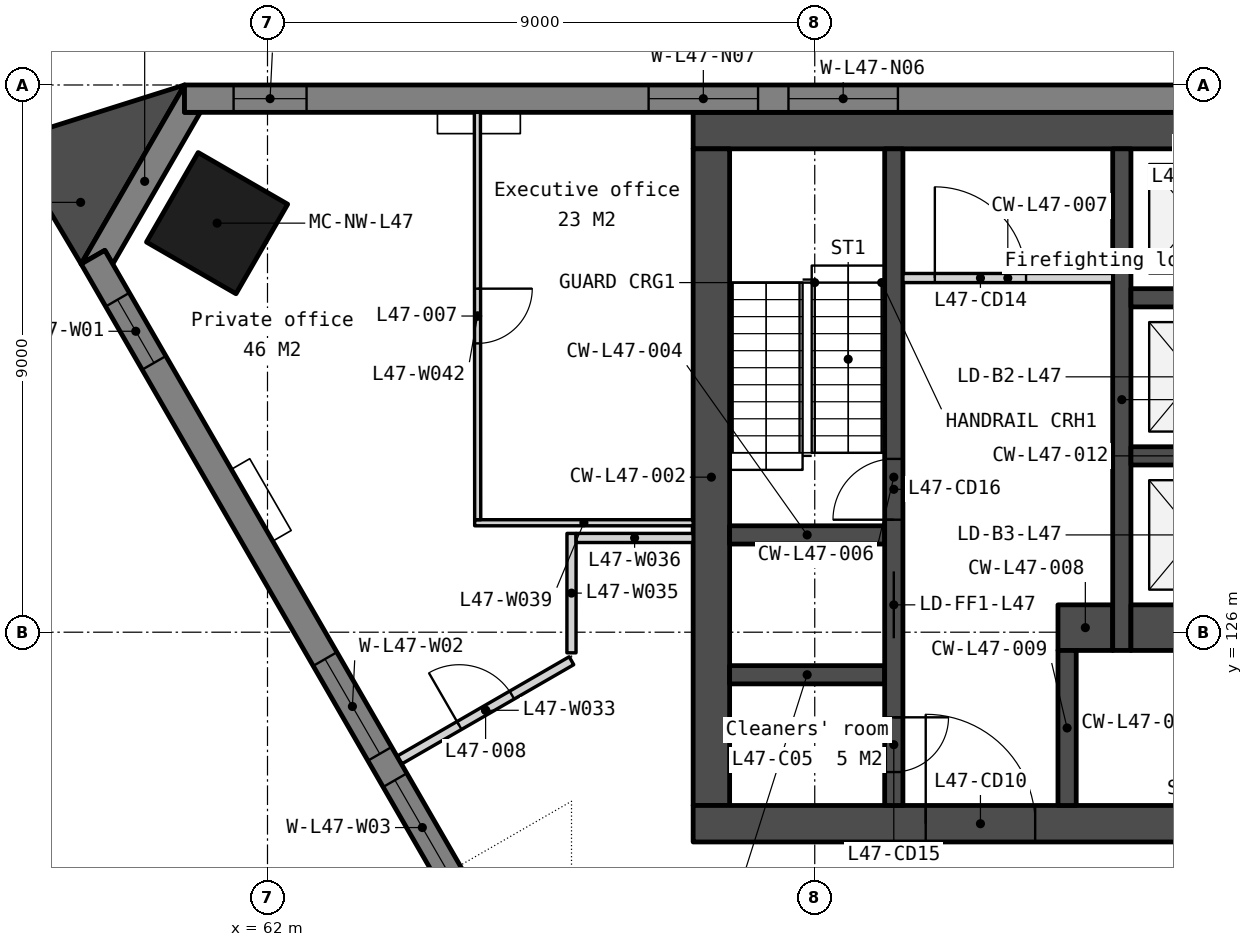
"""IFC4 building model, lengths in metres.
Left out: names, types, materials, properties, quantities, classifications, styles, units other than length and angle.
Written with IfcOpenShell. Run it as: python <this file> out.ifc"""

import sys

from ifc_helpers import new_model, si_unit, direction, frame, frame_2d, origin, origin_2d, place, context, subcontext, project, spatial, polyline, rectangle, outline, extrude, element, fill, save


model = new_model("IFC4")
c1 = context("Model", 3, precision=1e-05, world=origin(), true_north=direction((0.0, 1.0)))
c2 = subcontext(c1, "Body", "Model", "MODEL_VIEW")
j1 = project(units=[si_unit("LENGTHUNIT", "METRE"), si_unit("PLANEANGLEUNIT", "RADIAN")], contexts=[c1])
p1 = place(None, origin())
s1 = spatial("IfcSite", under=j1, at=p1, CompositionType="ELEMENT")
p2 = place(p1, origin())
s2 = spatial("IfcBuilding", under=s1, at=p2, CompositionType="ELEMENT")
p3 = place(p2, frame((0.0, 0.0, 188.0)))
s3 = spatial("IfcBuildingStorey", under=s2, at=p3, CompositionType="ELEMENT", Elevation=188.0)
p4 = place(p3, frame((61.171, 132.728, 0.0), z_axis=(0.0, 0.0, 1.0), x_axis=(-0.5, -0.866025403784, 0.0)))
e1 = element("IfcColumn", 1, at=p4, inside=s3, PredefinedType="COLUMN", context=c2, shape_type="SweptSolid", body=[
    extrude(rectangle(XDim=1.7, YDim=1.7, at=origin_2d()), origin(), (0.0, 0.0, 1.0), 3.9),
])
p5 = place(p3, frame((69.0, 134.25, 0.0), z_axis=(0.0, 0.0, 1.0), x_axis=(1.0, 0.0, 0.0)))
e2 = element("IfcWall", 2, at=p5, inside=s3, PredefinedType="SOLIDWALL", context=c2, shape_type="SweptSolid", body=[
    extrude(rectangle(XDim=22.0, YDim=0.6, at=frame_2d((11.0, 0.0))), origin(), (0.0, 0.0, 1.0), 3.75),
])
p6 = place(p3, frame((69.3, 133.95, 0.0), z_axis=(0.0, 0.0, 1.0), x_axis=(0.0, -1.0, 0.0)))
e3 = element("IfcWall", 3, at=p6, inside=s3, PredefinedType="SOLIDWALL", context=c2, shape_type="SweptSolid", body=[
    extrude(rectangle(XDim=10.8, YDim=0.6, at=frame_2d((5.4, 0.0))), origin(), (0.0, 0.0, 1.0), 3.75),
])
p7 = place(p3, frame((69.0, 122.85, 0.0), z_axis=(0.0, 0.0, 1.0), x_axis=(1.0, 0.0, 0.0)))
e4 = element("IfcWall", 4, at=p7, inside=s3, PredefinedType="SOLIDWALL", context=c2, shape_type="SweptSolid", body=[
    extrude(rectangle(XDim=22.0, YDim=0.6, at=frame_2d((11.0, 0.0))), origin(), (0.0, 0.0, 1.0), 3.75),
])
p8 = place(p7, frame((16.375, 0.0, 0.0)))
e5 = element("IfcOpeningElement", 5, at=p8, cuts=e4, PredefinedType="OPENING", context=c2, shape_type="SweptSolid", body=[
    extrude(rectangle(XDim=1.8, YDim=2.1, at=frame_2d((0.9, 1.05))), frame((0.0, 0.31, 0.0), z_axis=(0.0, -1.0, 0.0), x_axis=(1.0, 0.0, 0.0)), (0.0, 0.0, 1.0), 0.62),
])
p9 = place(p7, frame((3.825, 0.0, 0.0)))
e6 = element("IfcOpeningElement", 6, at=p9, cuts=e4, PredefinedType="OPENING", context=c2, shape_type="SweptSolid", body=[
    extrude(rectangle(XDim=1.8, YDim=2.1, at=frame_2d((0.9, 1.05))), frame((0.0, 0.31, 0.0), z_axis=(0.0, -1.0, 0.0), x_axis=(1.0, 0.0, 0.0)), (0.0, 0.0, 1.0), 0.62),
])
p10 = place(p7, frame((12.85, 0.0, 0.0)))
e7 = element("IfcOpeningElement", 7, at=p10, cuts=e4, PredefinedType="OPENING", context=c2, shape_type="SweptSolid", body=[
    extrude(rectangle(XDim=1.5, YDim=2.1, at=frame_2d((0.75, 1.05))), frame((0.0, 0.31, 0.0), z_axis=(0.0, -1.0, 0.0), x_axis=(1.0, 0.0, 0.0)), (0.0, 0.0, 1.0), 0.62),
])
for number, where, z_axis, x_axis in (
    (8, (69.6, 127.6, 0.0), (0.0, 0.0, 1.0), (1.0, 0.0, 0.0)),
    (9, (69.6, 125.3, 0.0), (0.0, 0.0, 1.0), (1.0, 0.0, 0.0)),
):
    element("IfcWall", number, at=place(p3, frame(where, z_axis=z_axis, x_axis=x_axis)), inside=s3, PredefinedType="SOLIDWALL", context=c2, shape_type="SweptSolid", body=[
        extrude(rectangle(XDim=2.55, YDim=0.3, at=frame_2d((1.275, 0.0))), origin(), (0.0, 0.0, 1.0), 3.75),
    ])
p11 = place(p3, frame((72.3, 133.95, 0.0), z_axis=(0.0, 0.0, 1.0), x_axis=(0.0, -1.0, 0.0)))
e10 = element("IfcWall", 10, at=p11, inside=s3, PredefinedType="SOLIDWALL", context=c2, shape_type="SweptSolid", body=[
    extrude(rectangle(XDim=10.8, YDim=0.3, at=frame_2d((5.4, 0.0))), origin(), (0.0, 0.0, 1.0), 3.75),
])
p12 = place(p11, frame((6.95, 0.0, 0.0)))
e11 = element("IfcOpeningElement", 11, at=p12, cuts=e10, PredefinedType="OPENING", context=c2, shape_type="SweptSolid", body=[
    extrude(rectangle(XDim=1.1, YDim=2.1, at=frame_2d((0.55, 1.05))), frame((0.0, 0.16, 0.0), z_axis=(0.0, -1.0, 0.0), x_axis=(1.0, 0.0, 0.0)), (0.0, 0.0, 1.0), 0.32),
])
p13 = place(p11, frame((9.35, 0.0, 0.0)))
e12 = element("IfcOpeningElement", 12, at=p13, cuts=e10, PredefinedType="OPENING", context=c2, shape_type="SweptSolid", body=[
    extrude(rectangle(XDim=0.9, YDim=2.1, at=frame_2d((0.45, 1.05))), frame((0.0, 0.16, 0.0), z_axis=(0.0, -1.0, 0.0), x_axis=(1.0, 0.0, 0.0)), (0.0, 0.0, 1.0), 0.32),
])
p14 = place(p11, frame((5.1, 0.0, 0.0)))
e13 = element("IfcOpeningElement", 13, at=p14, cuts=e10, PredefinedType="OPENING", context=c2, shape_type="SweptSolid", body=[
    extrude(rectangle(XDim=1.0, YDim=2.1, at=frame_2d((0.5, 1.05))), frame((0.0, 0.16, 0.0), z_axis=(0.0, -1.0, 0.0), x_axis=(1.0, 0.0, 0.0)), (0.0, 0.0, 1.0), 0.32),
])
p15 = place(p3, frame((72.45, 131.825, 0.0), z_axis=(0.0, 0.0, 1.0), x_axis=(1.0, 0.0, 0.0)))
e14 = element("IfcWall", 14, at=p15, inside=s3, PredefinedType="PARTITIONING", context=c2, shape_type="SweptSolid", body=[
    extrude(rectangle(XDim=3.45, YDim=0.15, at=frame_2d((1.725, 0.0))), origin(), (0.0, 0.0, 1.0), 3.75),
])
p16 = place(p15, frame((0.525, 0.0, 0.0)))
e15 = element("IfcOpeningElement", 15, at=p16, cuts=e14, PredefinedType="OPENING", context=c2, shape_type="SweptSolid", body=[
    extrude(rectangle(XDim=1.5, YDim=2.1, at=frame_2d((0.75, 1.05))), frame((0.0, 0.085, 0.0), z_axis=(0.0, -1.0, 0.0), x_axis=(1.0, 0.0, 0.0)), (0.0, 0.0, 1.0), 0.17),
])
p17 = place(p3, frame((75.0, 126.075, 0.0), z_axis=(0.0, 0.0, 1.0), x_axis=(1.0, 0.0, 0.0)))
e16 = element("IfcWall", 16, at=p17, inside=s3, PredefinedType="SOLIDWALL", context=c2, shape_type="SweptSolid", body=[
    extrude(rectangle(XDim=0.9, YDim=0.75, at=frame_2d((0.45, 0.0))), origin(), (0.0, 0.0, 1.0), 3.75),
])
p18 = place(p3, frame((75.15, 125.7, 0.0), z_axis=(0.0, 0.0, 1.0), x_axis=(0.0, -1.0, 0.0)))
e17 = element("IfcWall", 17, at=p18, inside=s3, PredefinedType="SOLIDWALL", context=c2, shape_type="SweptSolid", body=[
    extrude(rectangle(XDim=2.55, YDim=0.3, at=frame_2d((1.275, 0.0))), origin(), (0.0, 0.0, 1.0), 3.75),
])
p19 = place(p3, frame((76.05, 133.95, 0.0), z_axis=(0.0, 0.0, 1.0), x_axis=(0.0, -1.0, 0.0)))
e18 = element("IfcWall", 18, at=p19, inside=s3, PredefinedType="SOLIDWALL", context=c2, shape_type="SweptSolid", body=[
    extrude(rectangle(XDim=8.25, YDim=0.3, at=frame_2d((4.125, 0.0))), origin(), (0.0, 0.0, 1.0), 3.75),
])
for number, where, z_axis, x_axis in (
    (19, (76.2, 131.5, 0.0), (0.0, 0.0, 1.0), (1.0, 0.0, 0.0)),
    (20, (76.2, 128.9, 0.0), (0.0, 0.0, 1.0), (1.0, 0.0, 0.0)),
):
    element("IfcWall", number, at=place(p3, frame(where, z_axis=z_axis, x_axis=x_axis)), inside=s3, PredefinedType="SOLIDWALL", context=c2, shape_type="SweptSolid", body=[
        extrude(rectangle(XDim=2.1, YDim=0.3, at=frame_2d((1.05, 0.0))), origin(), (0.0, 0.0, 1.0), 3.75),
    ])
p20 = place(p3, frame((76.2, 126.075, 0.0), z_axis=(0.0, 0.0, 1.0), x_axis=(1.0, 0.0, 0.0)))
e21 = element("IfcWall", 21, at=p20, inside=s3, PredefinedType="SOLIDWALL", context=c2, shape_type="SweptSolid", body=[
    extrude(rectangle(XDim=2.1, YDim=0.75, at=frame_2d((1.05, 0.0))), origin(), (0.0, 0.0, 1.0), 3.75),
])
p21 = place(p3, frame((0.0, 0.0, -0.15)))
e22 = element("IfcWall", 22, at=p21, inside=s3, PredefinedType="SOLIDWALL", context=c2, shape_type="SweptSolid", body=[
    extrude(outline(polyline([(60.635, 135.0), (60.635, 134.55), (60.895, 134.55), (59.455, 132.055), (59.325, 132.281), (58.935, 132.055), (60.635, 135.0)])), origin(), (0.0, 0.0, 1.0), 3.9),
])
p22 = place(p3, frame((99.365, 134.775, -0.15), z_axis=(0.0, 0.0, 1.0), x_axis=(-1.0, 0.0, 0.0)))
e23 = element("IfcWall", 23, at=p22, inside=s3, PredefinedType="SOLIDWALL", context=c2, shape_type="SweptSolid", body=[
    extrude(outline(polyline([(38.729, 0.0), (38.729, 3.9), (0.0, 3.9), (0.0, 0.0), (38.729, 0.0)])), frame((0.0, 0.225, 0.0), z_axis=(0.0, -1.0, 0.0), x_axis=(1.0, 0.0, 0.0)), (0.0, 0.0, 1.0), 0.45),
])
p23 = place(p22, frame((0.807, 0.0, 0.95)))
e24 = element("IfcOpeningElement", 24, at=p23, cuts=e23, PredefinedType="OPENING", context=c2, shape_type="SweptSolid", body=[
    extrude(rectangle(XDim=1.2, YDim=2.2, at=frame_2d((0.6, 1.1))), frame((0.0, 0.235, 0.0), z_axis=(0.0, -1.0, 0.0), x_axis=(1.0, 0.0, 0.0)), (0.0, 0.0, 1.0), 0.47),
])
p24 = place(p22, frame((7.632, 0.0, 0.95)))
e25 = element("IfcOpeningElement", 25, at=p24, cuts=e23, PredefinedType="OPENING", context=c2, shape_type="SweptSolid", body=[
    extrude(rectangle(XDim=1.8, YDim=2.2, at=frame_2d((0.9, 1.1))), frame((0.0, 0.235, 0.0), z_axis=(0.0, -1.0, 0.0), x_axis=(1.0, 0.0, 0.0)), (0.0, 0.0, 1.0), 0.47),
])
p25 = place(p22, frame((9.932, 0.0, 0.95)))
e26 = element("IfcOpeningElement", 26, at=p25, cuts=e23, PredefinedType="OPENING", context=c2, shape_type="SweptSolid", body=[
    extrude(rectangle(XDim=1.8, YDim=2.2, at=frame_2d((0.9, 1.1))), frame((0.0, 0.235, 0.0), z_axis=(0.0, -1.0, 0.0), x_axis=(1.0, 0.0, 0.0)), (0.0, 0.0, 1.0), 0.47),
])
p26 = place(p22, frame((17.315, 0.0, 0.95)))
e27 = element("IfcOpeningElement", 27, at=p26, cuts=e23, PredefinedType="OPENING", context=c2, shape_type="SweptSolid", body=[
    extrude(rectangle(XDim=1.8, YDim=2.2, at=frame_2d((0.9, 1.1))), frame((0.0, 0.235, 0.0), z_axis=(0.0, -1.0, 0.0), x_axis=(1.0, 0.0, 0.0)), (0.0, 0.0, 1.0), 0.47),
])
p27 = place(p22, frame((19.615, 0.0, 0.95)))
e28 = element("IfcOpeningElement", 28, at=p27, cuts=e23, PredefinedType="OPENING", context=c2, shape_type="SweptSolid", body=[
    extrude(rectangle(XDim=1.8, YDim=2.2, at=frame_2d((0.9, 1.1))), frame((0.0, 0.235, 0.0), z_axis=(0.0, -1.0, 0.0), x_axis=(1.0, 0.0, 0.0)), (0.0, 0.0, 1.0), 0.47),
])
p28 = place(p22, frame((26.997, 0.0, 0.95)))
e29 = element("IfcOpeningElement", 29, at=p28, cuts=e23, PredefinedType="OPENING", context=c2, shape_type="SweptSolid", body=[
    extrude(rectangle(XDim=1.8, YDim=2.2, at=frame_2d((0.9, 1.1))), frame((0.0, 0.235, 0.0), z_axis=(0.0, -1.0, 0.0), x_axis=(1.0, 0.0, 0.0)), (0.0, 0.0, 1.0), 0.47),
])
p29 = place(p22, frame((29.297, 0.0, 0.95)))
e30 = element("IfcOpeningElement", 30, at=p29, cuts=e23, PredefinedType="OPENING", context=c2, shape_type="SweptSolid", body=[
    extrude(rectangle(XDim=1.8, YDim=2.2, at=frame_2d((0.9, 1.1))), frame((0.0, 0.235, 0.0), z_axis=(0.0, -1.0, 0.0), x_axis=(1.0, 0.0, 0.0)), (0.0, 0.0, 1.0), 0.47),
])
p30 = place(p22, frame((36.722, 0.0, 0.95)))
e31 = element("IfcOpeningElement", 31, at=p30, cuts=e23, PredefinedType="OPENING", context=c2, shape_type="SweptSolid", body=[
    extrude(rectangle(XDim=1.2, YDim=2.2, at=frame_2d((0.6, 1.1))), frame((0.0, 0.235, 0.0), z_axis=(0.0, -1.0, 0.0), x_axis=(1.0, 0.0, 0.0)), (0.0, 0.0, 1.0), 0.47),
])
p31 = place(p3, frame((59.13, 132.168, -0.15), z_axis=(0.0, 0.0, 1.0), x_axis=(0.500002199942, -0.866024133644, 0.0)))
e32 = element("IfcWall", 32, at=p31, inside=s3, PredefinedType="SOLIDWALL", context=c2, shape_type="SweptSolid", body=[
    extrude(outline(polyline([(38.729, 0.0), (38.729, 3.9), (0.0, 3.9), (0.0, 0.0), (38.729, 0.0)])), frame((0.0, 0.225, 0.0), z_axis=(0.0, -1.0, 0.0), x_axis=(1.0, 0.0, 0.0)), (0.0, 0.0, 1.0), 0.45),
])
p32 = place(p31, frame((0.807, 0.0, 0.95)))
e33 = element("IfcOpeningElement", 33, at=p32, cuts=e32, PredefinedType="OPENING", context=c2, shape_type="SweptSolid", body=[
    extrude(rectangle(XDim=1.2, YDim=2.2, at=frame_2d((0.6, 1.1))), frame((0.0, 0.235, 0.0), z_axis=(0.0, -1.0, 0.0), x_axis=(1.0, 0.0, 0.0)), (0.0, 0.0, 1.0), 0.47),
])
p33 = place(p31, frame((7.632, 0.0, 0.95)))
e34 = element("IfcOpeningElement", 34, at=p33, cuts=e32, PredefinedType="OPENING", context=c2, shape_type="SweptSolid", body=[
    extrude(rectangle(XDim=1.8, YDim=2.2, at=frame_2d((0.9, 1.1))), frame((0.0, 0.235, 0.0), z_axis=(0.0, -1.0, 0.0), x_axis=(1.0, 0.0, 0.0)), (0.0, 0.0, 1.0), 0.47),
])
p34 = place(p31, frame((9.932, 0.0, 0.95)))
e35 = element("IfcOpeningElement", 35, at=p34, cuts=e32, PredefinedType="OPENING", context=c2, shape_type="SweptSolid", body=[
    extrude(rectangle(XDim=1.8, YDim=2.2, at=frame_2d((0.9, 1.1))), frame((0.0, 0.235, 0.0), z_axis=(0.0, -1.0, 0.0), x_axis=(1.0, 0.0, 0.0)), (0.0, 0.0, 1.0), 0.47),
])
p35 = place(p31, frame((17.315, 0.0, 0.95)))
e36 = element("IfcOpeningElement", 36, at=p35, cuts=e32, PredefinedType="OPENING", context=c2, shape_type="SweptSolid", body=[
    extrude(rectangle(XDim=1.8, YDim=2.2, at=frame_2d((0.9, 1.1))), frame((0.0, 0.235, 0.0), z_axis=(0.0, -1.0, 0.0), x_axis=(1.0, 0.0, 0.0)), (0.0, 0.0, 1.0), 0.47),
])
p36 = place(p31, frame((19.615, 0.0, 0.95)))
e37 = element("IfcOpeningElement", 37, at=p36, cuts=e32, PredefinedType="OPENING", context=c2, shape_type="SweptSolid", body=[
    extrude(rectangle(XDim=1.8, YDim=2.2, at=frame_2d((0.9, 1.1))), frame((0.0, 0.235, 0.0), z_axis=(0.0, -1.0, 0.0), x_axis=(1.0, 0.0, 0.0)), (0.0, 0.0, 1.0), 0.47),
])
p37 = place(p31, frame((26.997, 0.0, 0.95)))
e38 = element("IfcOpeningElement", 38, at=p37, cuts=e32, PredefinedType="OPENING", context=c2, shape_type="SweptSolid", body=[
    extrude(rectangle(XDim=1.8, YDim=2.2, at=frame_2d((0.9, 1.1))), frame((0.0, 0.235, 0.0), z_axis=(0.0, -1.0, 0.0), x_axis=(1.0, 0.0, 0.0)), (0.0, 0.0, 1.0), 0.47),
])
p38 = place(p31, frame((29.297, 0.0, 0.95)))
e39 = element("IfcOpeningElement", 39, at=p38, cuts=e32, PredefinedType="OPENING", context=c2, shape_type="SweptSolid", body=[
    extrude(rectangle(XDim=1.8, YDim=2.2, at=frame_2d((0.9, 1.1))), frame((0.0, 0.235, 0.0), z_axis=(0.0, -1.0, 0.0), x_axis=(1.0, 0.0, 0.0)), (0.0, 0.0, 1.0), 0.47),
])
p39 = place(p31, frame((36.722, 0.0, 0.95)))
e40 = element("IfcOpeningElement", 40, at=p39, cuts=e32, PredefinedType="OPENING", context=c2, shape_type="SweptSolid", body=[
    extrude(rectangle(XDim=1.2, YDim=2.2, at=frame_2d((0.6, 1.1))), frame((0.0, 0.235, 0.0), z_axis=(0.0, -1.0, 0.0), x_axis=(1.0, 0.0, 0.0)), (0.0, 0.0, 1.0), 0.47),
])
p40 = place(p3, frame((0.0, 0.0, -0.15)))
e41 = element("IfcWall", 41, at=p40, inside=s3, PredefinedType="SOLIDWALL", context=c2, shape_type="SweptSolid", body=[
    extrude(outline(polyline([(60.635, 135.0), (57.73, 134.083), (58.935, 132.055), (60.635, 135.0)])), origin(), (0.0, 0.0, 1.0), 3.9),
])
p41 = place(p3, frame((64.175, 123.9, 0.0), z_axis=(0.0, 0.0, 1.0), x_axis=(0.866032230194, 0.499988176125, 0.0)))
e42 = element("IfcWall", 42, at=p41, inside=s3, PredefinedType="PARTITIONING", context=c2, shape_type="SweptSolid", body=[
    extrude(rectangle(XDim=3.261, YDim=0.15, at=frame_2d((1.63, 0.0))), origin(), (0.0, 0.0, 1.0), 3.75),
])
p42 = place(p41, frame((1.13, 0.0, 0.0)))
e43 = element("IfcOpeningElement", 43, at=p42, cuts=e42, PredefinedType="OPENING", context=c2, shape_type="SweptSolid", body=[
    extrude(rectangle(XDim=1.0, YDim=2.1, at=frame_2d((0.5, 1.05))), frame((0.0, 0.085, 0.0), z_axis=(0.0, -1.0, 0.0), x_axis=(1.0, 0.0, 0.0)), (0.0, 0.0, 1.0), 0.17),
])
p43 = place(p3, frame((66.999, 125.661, 0.0), z_axis=(0.0, 0.0, 1.0), x_axis=(0.00049720317, 0.999999876394, 0.0)))
e44 = element("IfcWall", 44, at=p43, inside=s3, PredefinedType="PARTITIONING", context=c2, shape_type="SweptSolid", body=[
    extrude(rectangle(XDim=1.964, YDim=0.15, at=frame_2d((0.982, 0.0))), origin(), (0.0, 0.0, 1.0), 3.75),
])
p44 = place(p3, frame((67.075, 127.55, 0.0), z_axis=(0.0, 0.0, 1.0), x_axis=(1.0, 0.0, 0.0)))
e45 = element("IfcWall", 45, at=p44, inside=s3, PredefinedType="PARTITIONING", context=c2, shape_type="SweptSolid", body=[
    extrude(rectangle(XDim=1.925, YDim=0.15, at=frame_2d((0.962, 0.0))), origin(), (0.0, 0.0, 1.0), 3.75),
])
p45 = place(p3, frame((65.407, 127.8, 0.0), z_axis=(0.0, 0.0, 1.0), x_axis=(1.0, 0.0, 0.0)))
e46 = element("IfcWall", 46, at=p45, inside=s3, PredefinedType="PARTITIONING", context=c2, shape_type="SweptSolid", body=[
    extrude(rectangle(XDim=3.593, YDim=0.1, at=frame_2d((1.796, 0.0))), origin(), (0.0, 0.0, 1.0), 3.28),
])
p46 = place(p3, frame((65.452, 134.55, 0.0), z_axis=(0.0, 0.0, 1.0), x_axis=(0.000728783103, -0.999999734438, 0.0)))
e47 = element("IfcWall", 47, at=p46, inside=s3, PredefinedType="PARTITIONING", context=c2, shape_type="SweptSolid", body=[
    extrude(rectangle(XDim=6.7, YDim=0.1, at=frame_2d((3.35, 0.0))), origin(), (0.0, 0.0, 1.0), 3.28),
])
p47 = place(p46, frame((2.9, 0.0, 0.0)))
e48 = element("IfcOpeningElement", 48, at=p47, cuts=e47, PredefinedType="OPENING", context=c2, shape_type="SweptSolid", body=[
    extrude(rectangle(XDim=0.9, YDim=2.1, at=frame_2d((0.45, 1.05))), frame((0.0, 0.06, 0.0), z_axis=(0.0, -1.0, 0.0), x_axis=(1.0, 0.0, 0.0)), (0.0, 0.0, 1.0), 0.12),
])
p48 = place(p12, origin())
e49 = element("IfcDoor", 49, at=p48, inside=s3, OperationType="SLIDING_TO_LEFT", PredefinedType="DOOR", context=c2, shape_type="SweptSolid", body=[
    extrude(rectangle(XDim=1.1, YDim=2.1, at=frame_2d((0.55, 1.05))), frame((0.0, 0.025, 0.0), z_axis=(0.0, -1.0, 0.0), x_axis=(1.0, 0.0, 0.0)), (0.0, 0.0, 1.0), 0.05),
])
fill(e11, e49)
p49 = place(p9, origin())
e50 = element("IfcDoor", 50, at=p49, inside=s3, OperationType="DOUBLE_DOOR_DOUBLE_SWING", PredefinedType="DOOR", context=c2, shape_type="SweptSolid", body=[
    extrude(rectangle(XDim=1.8, YDim=2.1, at=frame_2d((0.9, 1.05))), frame((0.0, 0.025, 0.0), z_axis=(0.0, -1.0, 0.0), x_axis=(1.0, 0.0, 0.0)), (0.0, 0.0, 1.0), 0.05),
])
fill(e6, e50)
p50 = place(p16, origin())
e51 = element("IfcDoor", 51, at=p50, inside=s3, OperationType="DOUBLE_DOOR_DOUBLE_SWING", PredefinedType="DOOR", context=c2, shape_type="SweptSolid", body=[
    extrude(rectangle(XDim=1.5, YDim=2.1, at=frame_2d((0.75, 1.05))), frame((0.0, 0.025, 0.0), z_axis=(0.0, -1.0, 0.0), x_axis=(1.0, 0.0, 0.0)), (0.0, 0.0, 1.0), 0.05),
])
fill(e15, e51)
p51 = place(p13, origin())
e52 = element("IfcDoor", 52, at=p51, inside=s3, OperationType="SINGLE_SWING_LEFT", PredefinedType="DOOR", context=c2, shape_type="SweptSolid", body=[
    extrude(rectangle(XDim=0.9, YDim=2.1, at=frame_2d((0.45, 1.05))), frame((0.0, 0.025, 0.0), z_axis=(0.0, -1.0, 0.0), x_axis=(1.0, 0.0, 0.0)), (0.0, 0.0, 1.0), 0.05),
])
fill(e12, e52)
p52 = place(p14, origin())
e53 = element("IfcDoor", 53, at=p52, inside=s3, OperationType="SINGLE_SWING_RIGHT", PredefinedType="DOOR", context=c2, shape_type="SweptSolid", body=[
    extrude(rectangle(XDim=1.0, YDim=2.1, at=frame_2d((0.5, 1.05))), frame((0.0, 0.025, 0.0), z_axis=(0.0, -1.0, 0.0), x_axis=(1.0, 0.0, 0.0)), (0.0, 0.0, 1.0), 0.05),
])
fill(e13, e53)
p53 = place(p28, origin())
e54 = element("IfcWindow", 54, at=p53, inside=s3, PartitioningType="SINGLE_PANEL", PredefinedType="WINDOW", context=c2, shape_type="SweptSolid", body=[
    extrude(rectangle(XDim=1.8, YDim=2.2, at=frame_2d((0.9, 1.1))), frame((0.0, 0.03, 0.0), z_axis=(0.0, -1.0, 0.0), x_axis=(1.0, 0.0, 0.0)), (0.0, 0.0, 1.0), 0.06),
])
fill(e29, e54)
p54 = place(p29, origin())
e55 = element("IfcWindow", 55, at=p54, inside=s3, PartitioningType="SINGLE_PANEL", PredefinedType="WINDOW", context=c2, shape_type="SweptSolid", body=[
    extrude(rectangle(XDim=1.8, YDim=2.2, at=frame_2d((0.9, 1.1))), frame((0.0, 0.03, 0.0), z_axis=(0.0, -1.0, 0.0), x_axis=(1.0, 0.0, 0.0)), (0.0, 0.0, 1.0), 0.06),
])
fill(e30, e55)
p55 = place(p30, origin())
e56 = element("IfcWindow", 56, at=p55, inside=s3, PartitioningType="SINGLE_PANEL", PredefinedType="WINDOW", context=c2, shape_type="SweptSolid", body=[
    extrude(rectangle(XDim=1.2, YDim=2.2, at=frame_2d((0.6, 1.1))), frame((0.0, 0.03, 0.0), z_axis=(0.0, -1.0, 0.0), x_axis=(1.0, 0.0, 0.0)), (0.0, 0.0, 1.0), 0.06),
])
fill(e31, e56)
p56 = place(p32, origin())
e57 = element("IfcWindow", 57, at=p56, inside=s3, PartitioningType="SINGLE_PANEL", PredefinedType="WINDOW", context=c2, shape_type="SweptSolid", body=[
    extrude(rectangle(XDim=1.2, YDim=2.2, at=frame_2d((0.6, 1.1))), frame((0.0, 0.03, 0.0), z_axis=(0.0, -1.0, 0.0), x_axis=(1.0, 0.0, 0.0)), (0.0, 0.0, 1.0), 0.06),
])
fill(e33, e57)
p57 = place(p33, origin())
e58 = element("IfcWindow", 58, at=p57, inside=s3, PartitioningType="SINGLE_PANEL", PredefinedType="WINDOW", context=c2, shape_type="SweptSolid", body=[
    extrude(rectangle(XDim=1.8, YDim=2.2, at=frame_2d((0.9, 1.1))), frame((0.0, 0.03, 0.0), z_axis=(0.0, -1.0, 0.0), x_axis=(1.0, 0.0, 0.0)), (0.0, 0.0, 1.0), 0.06),
])
fill(e34, e58)
p58 = place(p34, origin())
e59 = element("IfcWindow", 59, at=p58, inside=s3, PartitioningType="SINGLE_PANEL", PredefinedType="WINDOW", context=c2, shape_type="SweptSolid", body=[
    extrude(rectangle(XDim=1.8, YDim=2.2, at=frame_2d((0.9, 1.1))), frame((0.0, 0.03, 0.0), z_axis=(0.0, -1.0, 0.0), x_axis=(1.0, 0.0, 0.0)), (0.0, 0.0, 1.0), 0.06),
])
fill(e35, e59)
p59 = place(p47, origin())
e60 = element("IfcDoor", 60, at=p59, inside=s3, OperationType="SINGLE_SWING_LEFT", PredefinedType="DOOR", context=c2, shape_type="SweptSolid", body=[
    extrude(rectangle(XDim=0.9, YDim=2.1, at=frame_2d((0.45, 1.05))), frame((0.0, 0.025, 0.0), z_axis=(0.0, -1.0, 0.0), x_axis=(1.0, 0.0, 0.0)), (0.0, 0.0, 1.0), 0.05),
])
fill(e48, e60)
p60 = place(p42, origin())
e61 = element("IfcDoor", 61, at=p60, inside=s3, OperationType="SINGLE_SWING_LEFT", PredefinedType="DOOR", context=c2, shape_type="SweptSolid", body=[
    extrude(rectangle(XDim=1.0, YDim=2.1, at=frame_2d((0.5, 1.05))), frame((0.0, 0.025, 0.0), z_axis=(0.0, -1.0, 0.0), x_axis=(1.0, 0.0, 0.0)), (0.0, 0.0, 1.0), 0.05),
])
fill(e43, e61)
save(model, sys.argv[1])
